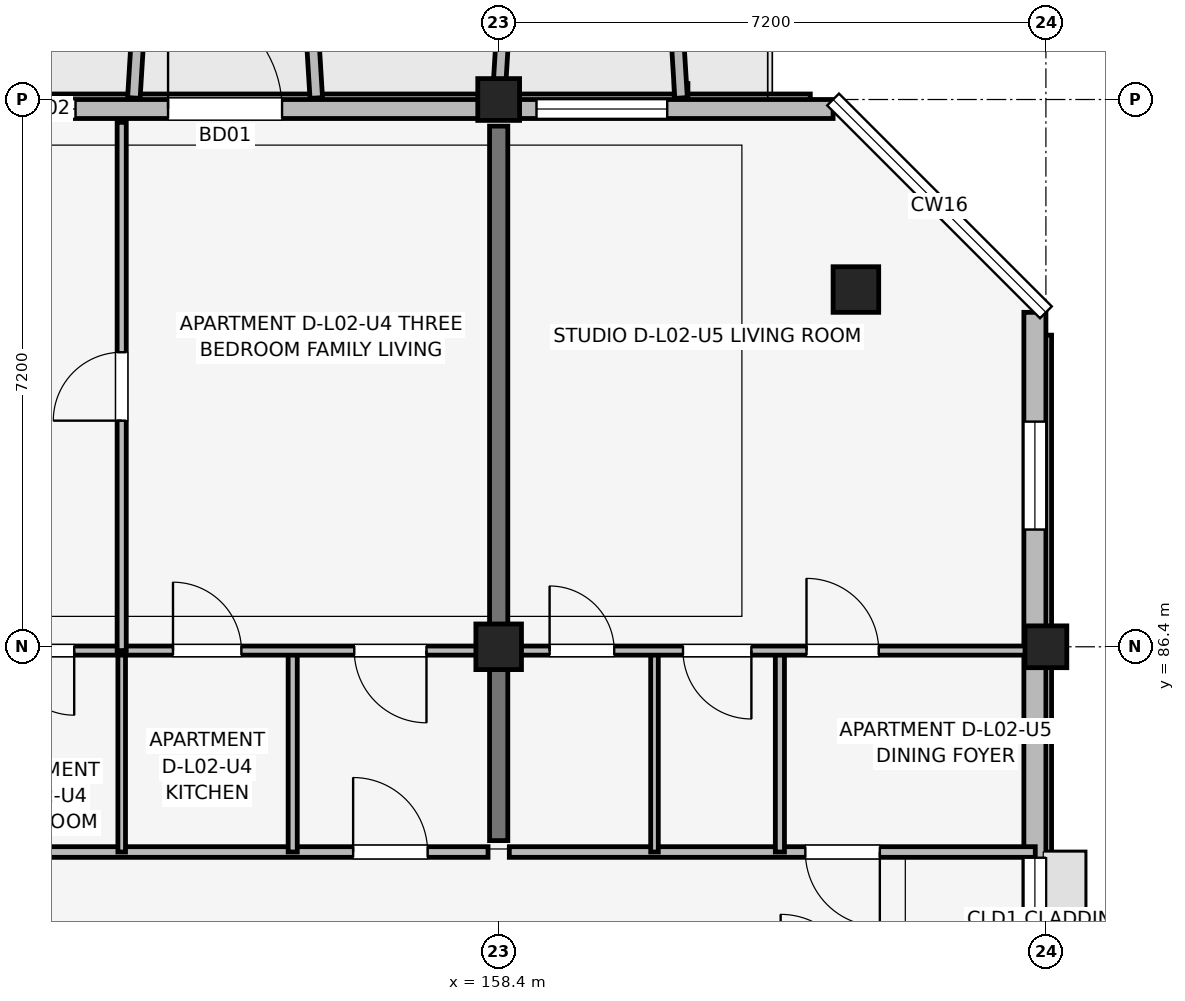
"""IFC4 building model, lengths in metres.
Left out: names, types, materials, properties, quantities, classifications, styles, units other than length and angle.
Written with IfcOpenShell. Run it as: python <this file> out.ifc"""

import sys

from ifc_helpers import new_model, si_unit, direction, frame, frame_2d, origin, origin_2d, place, context, subcontext, project, spatial, rectangle, extrude, element, fill, save


model = new_model("IFC4")
c1 = context("Model", 3, precision=1e-05, world=origin(), true_north=direction((0.0, 1.0)))
c2 = subcontext(c1, "Body", "Model", "MODEL_VIEW")
j1 = project(units=[si_unit("LENGTHUNIT", "METRE"), si_unit("PLANEANGLEUNIT", "RADIAN")], contexts=[c1])
p1 = place(None, origin())
s1 = spatial("IfcSite", under=j1, at=p1, CompositionType="ELEMENT")
p2 = place(p1, origin())
s2 = spatial("IfcBuilding", under=s1, at=p2, CompositionType="ELEMENT")
p3 = place(p2, frame((0.0, 0.0, 8.7)))
s3 = spatial("IfcBuildingStorey", under=s2, at=p3, CompositionType="ELEMENT", Elevation=8.7)
p4 = place(p3, frame((158.4, 86.4, 0.0), z_axis=(0.0, 0.0, 1.0), x_axis=(1.0, 0.0, 0.0)))
e1 = element("IfcColumn", 1, at=p4, inside=s3, PredefinedType="COLUMN", context=c2, shape_type="SweptSolid", body=[
    extrude(rectangle(XDim=0.6, YDim=0.6, at=origin_2d()), origin(), (0.0, 0.0, 1.0), 3.15),
])
for number, where, z_axis, x_axis in (
    (2, (158.4, 93.6, 0.0), (0.0, 0.0, 1.0), (1.0, 0.0, 0.0)),
    (3, (165.6, 86.4, 0.0), (0.0, 0.0, 1.0), (1.0, 0.0, 0.0)),
):
    element("IfcColumn", number, at=place(p3, frame(where, z_axis=z_axis, x_axis=x_axis)), inside=s3, PredefinedType="COLUMN", context=c2, shape_type="SweptSolid", body=[
        extrude(rectangle(XDim=0.55, YDim=0.55, at=origin_2d()), origin(), (0.0, 0.0, 1.0), 3.15),
    ])
p5 = place(p3, frame((163.1, 91.1, 0.0), z_axis=(0.0, 0.0, 1.0), x_axis=(1.0, 0.0, 0.0)))
e4 = element("IfcColumn", 4, at=p5, inside=s3, PredefinedType="COLUMN", context=c2, shape_type="SweptSolid", body=[
    extrude(rectangle(XDim=0.6, YDim=0.6, at=origin_2d()), origin(), (0.0, 0.0, 1.0), 3.15),
])
p6 = place(p3, frame((158.4, 83.85, 0.0), z_axis=(0.0, 0.0, 1.0), x_axis=(0.0, 1.0, 0.0)))
e5 = element("IfcWall", 5, at=p6, inside=s3, PredefinedType="SHEAR", context=c2, shape_type="SweptSolid", body=[
    extrude(rectangle(XDim=9.4, YDim=0.24, at=frame_2d((4.7, 0.0))), origin(), (0.0, 0.0, 1.0), 3.15),
])
p7 = place(p3, frame((165.455, 74.8, 0.0), z_axis=(0.0, 0.0, 1.0), x_axis=(0.0, 1.0, 0.0)))
e6 = element("IfcWall", 6, at=p7, inside=s3, PredefinedType="SOLIDWALL", context=c2, shape_type="SweptSolid", body=[
    extrude(rectangle(XDim=16.0, YDim=0.29, at=frame_2d((8.0, 0.0))), origin(), (0.0, 0.0, 1.0), 2.38),
])
p8 = place(p7, frame((7.175, 0.0, 1.05)))
e7 = element("IfcOpeningElement", 7, at=p8, cuts=e6, PredefinedType="OPENING", context=c2, shape_type="SweptSolid", body=[
    extrude(rectangle(XDim=1.65, YDim=1.15, at=frame_2d((0.825, 0.575))), frame((0.0, 0.155, 0.0), z_axis=(0.0, -1.0, 0.0), x_axis=(1.0, 0.0, 0.0)), (0.0, 0.0, 1.0), 0.31),
])
p9 = place(p7, frame((13.143, 0.0, 0.67)))
e8 = element("IfcOpeningElement", 8, at=p9, cuts=e6, PredefinedType="OPENING", context=c2, shape_type="SweptSolid", body=[
    extrude(rectangle(XDim=1.42, YDim=1.6, at=frame_2d((0.71, 0.8))), frame((0.0, 0.155, 0.0), z_axis=(0.0, -1.0, 0.0), x_axis=(1.0, 0.0, 0.0)), (0.0, 0.0, 1.0), 0.31),
])
p10 = place(p3, frame((162.8, 93.475, 0.0), z_axis=(0.0, 0.0, 1.0), x_axis=(-1.0, 0.0, 0.0)))
e9 = element("IfcWall", 9, at=p10, inside=s3, PredefinedType="SOLIDWALL", context=c2, shape_type="SweptSolid", body=[
    extrude(rectangle(XDim=30.4, YDim=0.25, at=frame_2d((15.2, 0.0))), origin(), (0.0, 0.0, 1.0), 2.43),
])
p11 = place(p10, frame((23.225, 0.0, 0.0), z_axis=(0.0, 0.0, 1.0), x_axis=(-1.0, 0.0, 0.0)))
e10 = element("IfcOpeningElement", 10, at=p11, cuts=e9, PredefinedType="OPENING", context=c2, shape_type="SweptSolid", body=[
    extrude(rectangle(XDim=1.65, YDim=2.15, at=frame_2d((0.825, 1.075))), frame((0.0, 0.135, 0.0), z_axis=(0.0, -1.0, 0.0), x_axis=(1.0, 0.0, 0.0)), (0.0, 0.0, 1.0), 0.27),
])
p12 = place(p10, frame((8.75, 0.0, 0.0), z_axis=(0.0, 0.0, 1.0), x_axis=(-1.0, 0.0, 0.0)))
e11 = element("IfcOpeningElement", 11, at=p12, cuts=e9, PredefinedType="OPENING", context=c2, shape_type="SweptSolid", body=[
    extrude(rectangle(XDim=1.5, YDim=2.15, at=frame_2d((0.75, 1.075))), frame((0.0, 0.135, 0.0), z_axis=(0.0, -1.0, 0.0), x_axis=(1.0, 0.0, 0.0)), (0.0, 0.0, 1.0), 0.27),
])
p13 = place(p10, frame((26.438, 0.0, 0.75)))
e12 = element("IfcOpeningElement", 12, at=p13, cuts=e9, PredefinedType="OPENING", context=c2, shape_type="SweptSolid", body=[
    extrude(rectangle(XDim=1.22, YDim=1.5, at=frame_2d((0.61, 0.75))), frame((0.0, 0.135, 0.0), z_axis=(0.0, -1.0, 0.0), x_axis=(1.0, 0.0, 0.0)), (0.0, 0.0, 1.0), 0.27),
])
p14 = place(p10, frame((24.183, 0.0, 0.75)))
e13 = element("IfcOpeningElement", 13, at=p14, cuts=e9, PredefinedType="OPENING", context=c2, shape_type="SweptSolid", body=[
    extrude(rectangle(XDim=1.34, YDim=1.55, at=frame_2d((0.67, 0.775))), frame((0.0, 0.135, 0.0), z_axis=(0.0, -1.0, 0.0), x_axis=(1.0, 0.0, 0.0)), (0.0, 0.0, 1.0), 0.27),
])
p15 = place(p10, frame((16.798, 0.0, 0.75)))
e14 = element("IfcOpeningElement", 14, at=p15, cuts=e9, PredefinedType="OPENING", context=c2, shape_type="SweptSolid", body=[
    extrude(rectangle(XDim=1.46, YDim=1.55, at=frame_2d((0.73, 0.775))), frame((0.0, 0.135, 0.0), z_axis=(0.0, -1.0, 0.0), x_axis=(1.0, 0.0, 0.0)), (0.0, 0.0, 1.0), 0.27),
])
p16 = place(p10, frame((14.34, 0.0, 0.7)))
e15 = element("IfcOpeningElement", 15, at=p16, cuts=e9, PredefinedType="OPENING", context=c2, shape_type="SweptSolid", body=[
    extrude(rectangle(XDim=1.72, YDim=1.6, at=frame_2d((0.86, 0.8))), frame((0.0, 0.135, 0.0), z_axis=(0.0, -1.0, 0.0), x_axis=(1.0, 0.0, 0.0)), (0.0, 0.0, 1.0), 0.27),
])
p17 = place(p10, frame((9.968, 0.0, 0.75)))
e16 = element("IfcOpeningElement", 16, at=p17, cuts=e9, PredefinedType="OPENING", context=c2, shape_type="SweptSolid", body=[
    extrude(rectangle(XDim=0.72, YDim=1.35, at=frame_2d((0.36, 0.675))), frame((0.0, 0.135, 0.0), z_axis=(0.0, -1.0, 0.0), x_axis=(1.0, 0.0, 0.0)), (0.0, 0.0, 1.0), 0.27),
])
p18 = place(p10, frame((2.183, 0.0, 0.7)))
e17 = element("IfcOpeningElement", 17, at=p18, cuts=e9, PredefinedType="OPENING", context=c2, shape_type="SweptSolid", body=[
    extrude(rectangle(XDim=1.72, YDim=1.6, at=frame_2d((0.86, 0.8))), frame((0.0, 0.135, 0.0), z_axis=(0.0, -1.0, 0.0), x_axis=(1.0, 0.0, 0.0)), (0.0, 0.0, 1.0), 0.27),
])
for number, where, z_axis, x_axis in (
    (18, (153.6, 93.62, 0.0), (0.0, 0.0, 1.0), (0.061, 0.998, 0.0)),
    (19, (156.0, 93.62, 0.0), (0.0, 0.0, 1.0), (-0.061, 0.998, 0.0)),
):
    element("IfcWall", number, at=place(p3, frame(where, z_axis=z_axis, x_axis=x_axis)), inside=s3, PredefinedType="ELEMENTEDWALL", context=c2, shape_type="SweptSolid", body=[
        extrude(rectangle(XDim=1.964, YDim=0.165, at=frame_2d((0.982, 0.0))), origin(), (0.0, 0.0, 1.0), 2.55),
    ])
for number, where, z_axis, x_axis in (
    (20, (158.4, 93.62, 0.0), (0.0, 0.0, 1.0), (0.061, 0.998, 0.0)),
    (21, (160.8, 93.62, 0.0), (0.0, 0.0, 1.0), (-0.061, 0.998, 0.0)),
):
    element("IfcWall", number, at=place(p3, frame(where, z_axis=z_axis, x_axis=x_axis)), inside=s3, PredefinedType="ELEMENTEDWALL", context=c2, shape_type="SweptSolid", body=[
        extrude(rectangle(XDim=1.964, YDim=0.165, at=frame_2d((0.982, 0.0))), origin(), (0.0, 0.0, 1.0), 2.95),
    ])
p19 = place(p3, frame((151.34, 83.7, 0.0), z_axis=(0.0, 0.0, 1.0), x_axis=(1.0, 0.0, 0.0)))
e22 = element("IfcWall", 22, at=p19, inside=s3, PredefinedType="PARTITIONING", context=c2, shape_type="SweptSolid", body=[
    extrude(rectangle(XDim=6.92, YDim=0.14, at=frame_2d((3.46, 0.0))), origin(), (0.0, 0.0, 1.0), 2.38),
])
p20 = place(p19, frame((5.145, 0.0, 0.0)))
e23 = element("IfcOpeningElement", 23, at=p20, cuts=e22, PredefinedType="OPENING", context=c2, shape_type="SweptSolid", body=[
    extrude(rectangle(XDim=0.98, YDim=2.1, at=frame_2d((0.49, 1.05))), frame((0.0, 0.08, 0.0), z_axis=(0.0, -1.0, 0.0), x_axis=(1.0, 0.0, 0.0)), (0.0, 0.0, 1.0), 0.16),
])
p21 = place(p3, frame((153.44, 83.7, 0.0), z_axis=(0.0, 0.0, 1.0), x_axis=(0.0, 1.0, 0.0)))
e24 = element("IfcWall", 24, at=p21, inside=s3, PredefinedType="PARTITIONING", context=c2, shape_type="SweptSolid", body=[
    extrude(rectangle(XDim=2.65, YDim=0.1, at=frame_2d((1.325, 0.0))), origin(), (0.0, 0.0, 1.0), 2.375),
])
p22 = place(p3, frame((155.69, 83.7, 0.0), z_axis=(0.0, 0.0, 1.0), x_axis=(0.0, 1.0, 0.0)))
e25 = element("IfcWall", 25, at=p22, inside=s3, PredefinedType="PARTITIONING", context=c2, shape_type="SweptSolid", body=[
    extrude(rectangle(XDim=2.65, YDim=0.12, at=frame_2d((1.325, 0.0))), origin(), (0.0, 0.0, 1.0), 2.375),
])
p23 = place(p3, frame((151.34, 86.35, 0.0), z_axis=(0.0, 0.0, 1.0), x_axis=(1.0, 0.0, 0.0)))
e26 = element("IfcWall", 26, at=p23, inside=s3, PredefinedType="PARTITIONING", context=c2, shape_type="SweptSolid", body=[
    extrude(rectangle(XDim=6.92, YDim=0.12, at=frame_2d((3.46, 0.0))), origin(), (0.0, 0.0, 1.0), 2.375),
])
p24 = place(p23, frame((1.475, 0.0, 0.0), z_axis=(0.0, 0.0, 1.0), x_axis=(-1.0, 0.0, 0.0)))
e27 = element("IfcOpeningElement", 27, at=p24, cuts=e26, PredefinedType="OPENING", context=c2, shape_type="SweptSolid", body=[
    extrude(rectangle(XDim=0.85, YDim=2.08, at=frame_2d((0.425, 1.04))), frame((0.0, 0.07, 0.0), z_axis=(0.0, -1.0, 0.0), x_axis=(1.0, 0.0, 0.0)), (0.0, 0.0, 1.0), 0.14),
])
p25 = place(p23, frame((2.775, 0.0, 0.0)))
e28 = element("IfcOpeningElement", 28, at=p25, cuts=e26, PredefinedType="OPENING", context=c2, shape_type="SweptSolid", body=[
    extrude(rectangle(XDim=0.9, YDim=2.08, at=frame_2d((0.45, 1.04))), frame((0.0, 0.07, 0.0), z_axis=(0.0, -1.0, 0.0), x_axis=(1.0, 0.0, 0.0)), (0.0, 0.0, 1.0), 0.14),
])
p26 = place(p23, frame((6.11, 0.0, 0.0), z_axis=(0.0, 0.0, 1.0), x_axis=(-1.0, 0.0, 0.0)))
e29 = element("IfcOpeningElement", 29, at=p26, cuts=e26, PredefinedType="OPENING", context=c2, shape_type="SweptSolid", body=[
    extrude(rectangle(XDim=0.95, YDim=2.08, at=frame_2d((0.475, 1.04))), frame((0.0, 0.07, 0.0), z_axis=(0.0, -1.0, 0.0), x_axis=(1.0, 0.0, 0.0)), (0.0, 0.0, 1.0), 0.14),
])
p27 = place(p3, frame((153.44, 86.35, 0.0), z_axis=(0.0, 0.0, 1.0), x_axis=(0.0, 1.0, 0.0)))
e30 = element("IfcWall", 30, at=p27, inside=s3, PredefinedType="PARTITIONING", context=c2, shape_type="SweptSolid", body=[
    extrude(rectangle(XDim=6.95, YDim=0.12, at=frame_2d((3.475, 0.0))), origin(), (0.0, 0.0, 1.0), 2.375),
])
p28 = place(p27, frame((3.025, 0.0, 0.0)))
e31 = element("IfcOpeningElement", 31, at=p28, cuts=e30, PredefinedType="OPENING", context=c2, shape_type="SweptSolid", body=[
    extrude(rectangle(XDim=0.9, YDim=2.08, at=frame_2d((0.45, 1.04))), frame((0.0, 0.07, 0.0), z_axis=(0.0, -1.0, 0.0), x_axis=(1.0, 0.0, 0.0)), (0.0, 0.0, 1.0), 0.14),
])
p29 = place(p3, frame((158.54, 83.7, 0.0), z_axis=(0.0, 0.0, 1.0), x_axis=(1.0, 0.0, 0.0)))
e32 = element("IfcWall", 32, at=p29, inside=s3, PredefinedType="PARTITIONING", context=c2, shape_type="SweptSolid", body=[
    extrude(rectangle(XDim=6.92, YDim=0.14, at=frame_2d((3.46, 0.0))), origin(), (0.0, 0.0, 1.0), 2.38),
])
p30 = place(p29, frame((4.875, 0.0, 0.0), z_axis=(0.0, 0.0, 1.0), x_axis=(-1.0, 0.0, 0.0)))
e33 = element("IfcOpeningElement", 33, at=p30, cuts=e32, PredefinedType="OPENING", context=c2, shape_type="SweptSolid", body=[
    extrude(rectangle(XDim=0.98, YDim=2.1, at=frame_2d((0.49, 1.05))), frame((0.0, 0.08, 0.0), z_axis=(0.0, -1.0, 0.0), x_axis=(1.0, 0.0, 0.0)), (0.0, 0.0, 1.0), 0.16),
])
p31 = place(p3, frame((160.45, 83.7, 0.0), z_axis=(0.0, 0.0, 1.0), x_axis=(0.0, 1.0, 0.0)))
e34 = element("IfcWall", 34, at=p31, inside=s3, PredefinedType="PARTITIONING", context=c2, shape_type="SweptSolid", body=[
    extrude(rectangle(XDim=2.65, YDim=0.1, at=frame_2d((1.325, 0.0))), origin(), (0.0, 0.0, 1.0), 2.375),
])
p32 = place(p3, frame((162.1, 83.7, 0.0), z_axis=(0.0, 0.0, 1.0), x_axis=(0.0, 1.0, 0.0)))
e35 = element("IfcWall", 35, at=p32, inside=s3, PredefinedType="PARTITIONING", context=c2, shape_type="SweptSolid", body=[
    extrude(rectangle(XDim=2.65, YDim=0.12, at=frame_2d((1.325, 0.0))), origin(), (0.0, 0.0, 1.0), 2.375),
])
p33 = place(p3, frame((158.54, 86.35, 0.0), z_axis=(0.0, 0.0, 1.0), x_axis=(1.0, 0.0, 0.0)))
e36 = element("IfcWall", 36, at=p33, inside=s3, PredefinedType="PARTITIONING", context=c2, shape_type="SweptSolid", body=[
    extrude(rectangle(XDim=6.92, YDim=0.12, at=frame_2d((3.46, 0.0))), origin(), (0.0, 0.0, 1.0), 2.375),
])
p34 = place(p33, frame((0.53, 0.0, 0.0)))
e37 = element("IfcOpeningElement", 37, at=p34, cuts=e36, PredefinedType="OPENING", context=c2, shape_type="SweptSolid", body=[
    extrude(rectangle(XDim=0.85, YDim=2.08, at=frame_2d((0.425, 1.04))), frame((0.0, 0.07, 0.0), z_axis=(0.0, -1.0, 0.0), x_axis=(1.0, 0.0, 0.0)), (0.0, 0.0, 1.0), 0.14),
])
p35 = place(p33, frame((3.185, 0.0, 0.0), z_axis=(0.0, 0.0, 1.0), x_axis=(-1.0, 0.0, 0.0)))
e38 = element("IfcOpeningElement", 38, at=p35, cuts=e36, PredefinedType="OPENING", context=c2, shape_type="SweptSolid", body=[
    extrude(rectangle(XDim=0.9, YDim=2.08, at=frame_2d((0.45, 1.04))), frame((0.0, 0.07, 0.0), z_axis=(0.0, -1.0, 0.0), x_axis=(1.0, 0.0, 0.0)), (0.0, 0.0, 1.0), 0.14),
])
p36 = place(p33, frame((3.91, 0.0, 0.0)))
e39 = element("IfcOpeningElement", 39, at=p36, cuts=e36, PredefinedType="OPENING", context=c2, shape_type="SweptSolid", body=[
    extrude(rectangle(XDim=0.95, YDim=2.08, at=frame_2d((0.475, 1.04))), frame((0.0, 0.07, 0.0), z_axis=(0.0, -1.0, 0.0), x_axis=(1.0, 0.0, 0.0)), (0.0, 0.0, 1.0), 0.14),
])
p37 = place(p12, origin())
e40 = element("IfcDoor", 40, at=p37, inside=s3, OperationType="SINGLE_SWING_RIGHT", PredefinedType="DOOR", context=c2, shape_type="SweptSolid", body=[
    extrude(rectangle(XDim=1.5, YDim=2.15, at=frame_2d((0.75, 1.075))), frame((0.0, 0.025, 0.0), z_axis=(0.0, -1.0, 0.0), x_axis=(1.0, 0.0, 0.0)), (0.0, 0.0, 1.0), 0.05),
])
fill(e11, e40)
p38 = place(p17, origin())
e41 = element("IfcWindow", 41, at=p38, inside=s3, PartitioningType="SINGLE_PANEL", PredefinedType="WINDOW", context=c2, shape_type="SweptSolid", body=[
    extrude(rectangle(XDim=0.72, YDim=1.35, at=frame_2d((0.36, 0.675))), frame((0.0, 0.03, 0.0), z_axis=(0.0, -1.0, 0.0), x_axis=(1.0, 0.0, 0.0)), (0.0, 0.0, 1.0), 0.06),
])
fill(e16, e41)
p39 = place(p18, origin())
e42 = element("IfcWindow", 42, at=p39, inside=s3, PartitioningType="SINGLE_PANEL", PredefinedType="WINDOW", context=c2, shape_type="SweptSolid", body=[
    extrude(rectangle(XDim=1.72, YDim=1.6, at=frame_2d((0.86, 0.8))), frame((0.0, 0.03, 0.0), z_axis=(0.0, -1.0, 0.0), x_axis=(1.0, 0.0, 0.0)), (0.0, 0.0, 1.0), 0.06),
])
fill(e17, e42)
p40 = place(p8, origin())
e43 = element("IfcWindow", 43, at=p40, inside=s3, PartitioningType="SINGLE_PANEL", PredefinedType="WINDOW", context=c2, shape_type="SweptSolid", body=[
    extrude(rectangle(XDim=1.65, YDim=1.15, at=frame_2d((0.825, 0.575))), frame((0.0, 0.03, 0.0), z_axis=(0.0, -1.0, 0.0), x_axis=(1.0, 0.0, 0.0)), (0.0, 0.0, 1.0), 0.06),
])
fill(e7, e43)
p41 = place(p9, origin())
e44 = element("IfcWindow", 44, at=p41, inside=s3, PartitioningType="SINGLE_PANEL", PredefinedType="WINDOW", context=c2, shape_type="SweptSolid", body=[
    extrude(rectangle(XDim=1.42, YDim=1.6, at=frame_2d((0.71, 0.8))), frame((0.0, 0.03, 0.0), z_axis=(0.0, -1.0, 0.0), x_axis=(1.0, 0.0, 0.0)), (0.0, 0.0, 1.0), 0.06),
])
fill(e8, e44)
p42 = place(p20, origin())
e45 = element("IfcDoor", 45, at=p42, inside=s3, OperationType="SINGLE_SWING_LEFT", PredefinedType="DOOR", context=c2, shape_type="SweptSolid", body=[
    extrude(rectangle(XDim=0.98, YDim=2.1, at=frame_2d((0.49, 1.05))), frame((0.0, 0.025, 0.0), z_axis=(0.0, -1.0, 0.0), x_axis=(1.0, 0.0, 0.0)), (0.0, 0.0, 1.0), 0.05),
])
fill(e23, e45)
p43 = place(p24, origin())
e46 = element("IfcDoor", 46, at=p43, inside=s3, OperationType="SINGLE_SWING_RIGHT", PredefinedType="DOOR", context=c2, shape_type="SweptSolid", body=[
    extrude(rectangle(XDim=0.85, YDim=2.08, at=frame_2d((0.425, 1.04))), frame((0.0, 0.025, 0.0), z_axis=(0.0, -1.0, 0.0), x_axis=(1.0, 0.0, 0.0)), (0.0, 0.0, 1.0), 0.05),
])
fill(e27, e46)
p44 = place(p25, origin())
e47 = element("IfcDoor", 47, at=p44, inside=s3, OperationType="SINGLE_SWING_LEFT", PredefinedType="DOOR", context=c2, shape_type="SweptSolid", body=[
    extrude(rectangle(XDim=0.9, YDim=2.08, at=frame_2d((0.45, 1.04))), frame((0.0, 0.025, 0.0), z_axis=(0.0, -1.0, 0.0), x_axis=(1.0, 0.0, 0.0)), (0.0, 0.0, 1.0), 0.05),
])
fill(e28, e47)
p45 = place(p26, origin())
e48 = element("IfcDoor", 48, at=p45, inside=s3, OperationType="SINGLE_SWING_RIGHT", PredefinedType="DOOR", context=c2, shape_type="SweptSolid", body=[
    extrude(rectangle(XDim=0.95, YDim=2.08, at=frame_2d((0.475, 1.04))), frame((0.0, 0.025, 0.0), z_axis=(0.0, -1.0, 0.0), x_axis=(1.0, 0.0, 0.0)), (0.0, 0.0, 1.0), 0.05),
])
fill(e29, e48)
p46 = place(p28, origin())
e49 = element("IfcDoor", 49, at=p46, inside=s3, OperationType="SINGLE_SWING_LEFT", PredefinedType="DOOR", context=c2, shape_type="SweptSolid", body=[
    extrude(rectangle(XDim=0.9, YDim=2.08, at=frame_2d((0.45, 1.04))), frame((0.0, 0.025, 0.0), z_axis=(0.0, -1.0, 0.0), x_axis=(1.0, 0.0, 0.0)), (0.0, 0.0, 1.0), 0.05),
])
fill(e31, e49)
p47 = place(p30, origin())
e50 = element("IfcDoor", 50, at=p47, inside=s3, OperationType="SINGLE_SWING_RIGHT", PredefinedType="DOOR", context=c2, shape_type="SweptSolid", body=[
    extrude(rectangle(XDim=0.98, YDim=2.1, at=frame_2d((0.49, 1.05))), frame((0.0, 0.025, 0.0), z_axis=(0.0, -1.0, 0.0), x_axis=(1.0, 0.0, 0.0)), (0.0, 0.0, 1.0), 0.05),
])
fill(e33, e50)
p48 = place(p34, origin())
e51 = element("IfcDoor", 51, at=p48, inside=s3, OperationType="SINGLE_SWING_LEFT", PredefinedType="DOOR", context=c2, shape_type="SweptSolid", body=[
    extrude(rectangle(XDim=0.85, YDim=2.08, at=frame_2d((0.425, 1.04))), frame((0.0, 0.025, 0.0), z_axis=(0.0, -1.0, 0.0), x_axis=(1.0, 0.0, 0.0)), (0.0, 0.0, 1.0), 0.05),
])
fill(e37, e51)
p49 = place(p35, origin())
e52 = element("IfcDoor", 52, at=p49, inside=s3, OperationType="SINGLE_SWING_RIGHT", PredefinedType="DOOR", context=c2, shape_type="SweptSolid", body=[
    extrude(rectangle(XDim=0.9, YDim=2.08, at=frame_2d((0.45, 1.04))), frame((0.0, 0.025, 0.0), z_axis=(0.0, -1.0, 0.0), x_axis=(1.0, 0.0, 0.0)), (0.0, 0.0, 1.0), 0.05),
])
fill(e38, e52)
p50 = place(p36, origin())
e53 = element("IfcDoor", 53, at=p50, inside=s3, OperationType="SINGLE_SWING_LEFT", PredefinedType="DOOR", context=c2, shape_type="SweptSolid", body=[
    extrude(rectangle(XDim=0.95, YDim=2.08, at=frame_2d((0.475, 1.04))), frame((0.0, 0.025, 0.0), z_axis=(0.0, -1.0, 0.0), x_axis=(1.0, 0.0, 0.0)), (0.0, 0.0, 1.0), 0.05),
])
fill(e39, e53)
save(model, sys.argv[1])
